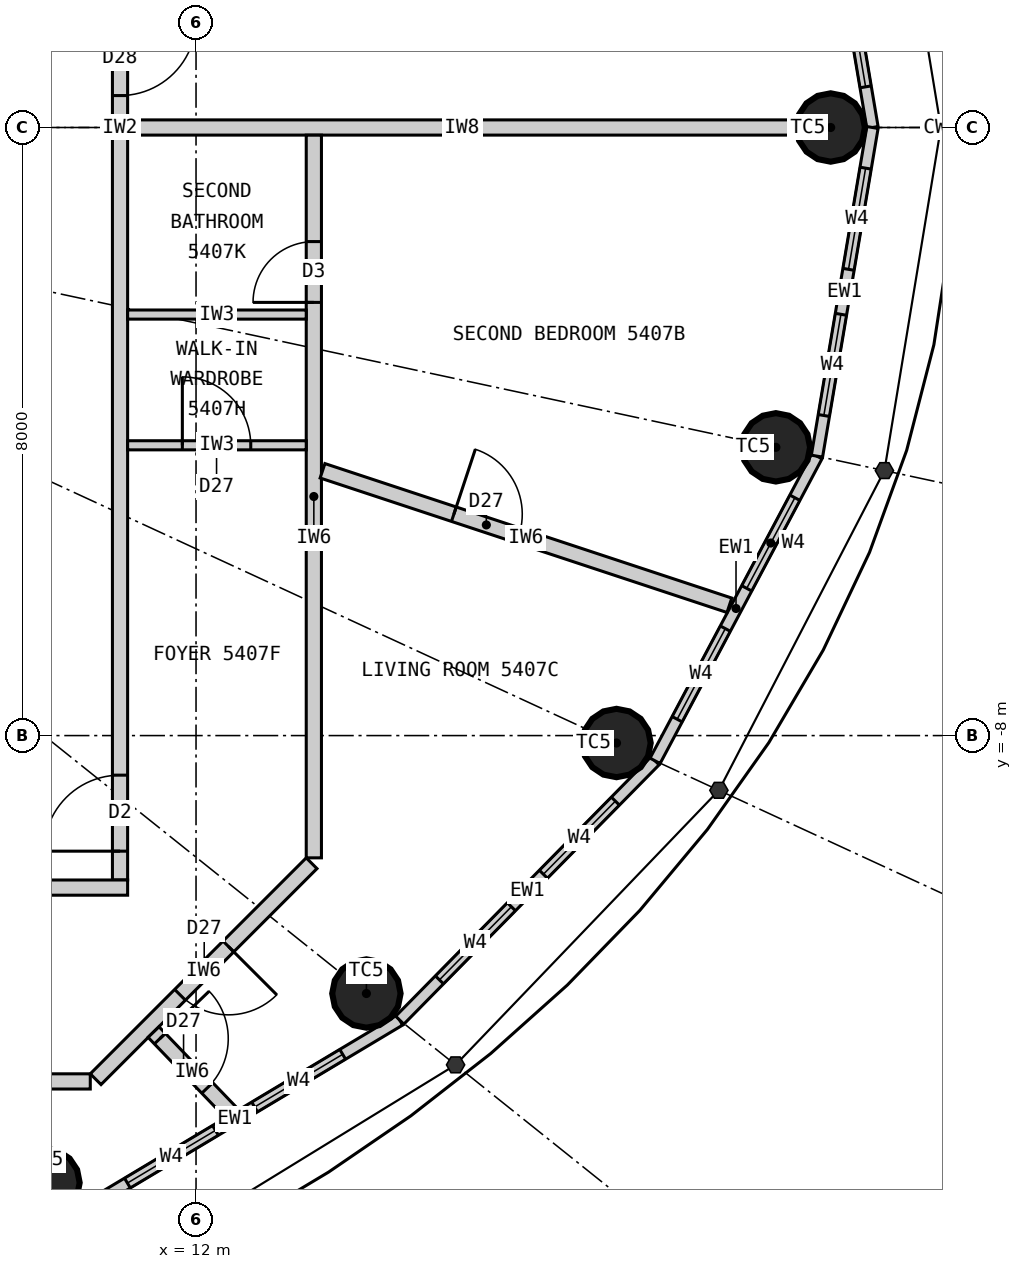
"""IFC4 building model, lengths in metres.
Left out: names, types, materials, properties, quantities, classifications, styles, units other than length and angle.
Written with IfcOpenShell. Run it as: python <this file> out.ifc"""

import sys

from ifc_helpers import new_model, si_unit, direction, frame, frame_2d, origin, origin_2d, place, context, subcontext, project, spatial, rectangle, circle, extrude, element, fill, save


model = new_model("IFC4")
c1 = context("Model", 3, precision=1e-05, world=origin(), true_north=direction((0.0, 1.0)))
c2 = subcontext(c1, "Body", "Model", "MODEL_VIEW")
j1 = project(units=[si_unit("LENGTHUNIT", "METRE"), si_unit("PLANEANGLEUNIT", "RADIAN")], contexts=[c1])
p1 = place(None, origin())
s1 = spatial("IfcSite", under=j1, at=p1, CompositionType="ELEMENT")
p2 = place(p1, origin())
s2 = spatial("IfcBuilding", under=s1, at=p2, CompositionType="ELEMENT")
p3 = place(p2, frame((0.0, 0.0, 202.8)))
s3 = spatial("IfcBuildingStorey", under=s2, at=p3, CompositionType="ELEMENT", Elevation=202.8)
for number, where, z_axis, x_axis in (
    (1, (20.35, 0.0, 0.0), (0.0, 0.0, 1.0), (1.0, 0.0, 0.0)),
    (2, (10.019, -13.883, 0.0), (0.0, 0.0, 1.0), (1.0, 0.0, 0.0)),
    (3, (14.241, -11.393, 0.0), (0.0, 0.0, 1.0), (1.0, 0.0, 0.0)),
    (4, (17.532, -8.098, 0.0), (0.0, 0.0, 1.0), (1.0, 0.0, 0.0)),
    (5, (19.629, -4.208, 0.0), (0.0, 0.0, 1.0), (1.0, 0.0, 0.0)),
):
    element("IfcColumn", number, at=place(p3, frame(where, z_axis=z_axis, x_axis=x_axis)), inside=s3, PredefinedType="COLUMN", context=c2, shape_type="SweptSolid", body=[
        extrude(circle(Radius=0.45, at=origin_2d()), origin(), (0.0, 0.0, 1.0), 3.3),
    ])
p4 = place(p3, frame((20.9, 0.0, 0.0), z_axis=(0.0, 0.0, 1.0), x_axis=(-0.166538513568, 0.986034950445, 0.0)))
e6 = element("IfcWall", 6, at=p4, inside=s3, PredefinedType="ELEMENTEDWALL", context=c2, shape_type="SweptSolid", body=[
    extrude(rectangle(XDim=4.385, YDim=0.15, at=frame_2d((2.192, 0.0))), origin(), (0.0, 0.0, 1.0), 3.12),
])
p5 = place(p4, frame((0.542, 0.0, 0.9)))
e7 = element("IfcOpeningElement", 7, at=p5, cuts=e6, PredefinedType="OPENING", context=c2, shape_type="SweptSolid", body=[
    extrude(rectangle(XDim=1.35, YDim=1.9, at=frame_2d((0.675, 0.95))), frame((0.0, 0.085, 0.0), z_axis=(0.0, -1.0, 0.0), x_axis=(1.0, 0.0, 0.0)), (0.0, 0.0, 1.0), 0.17),
])
p6 = place(p4, frame((2.492, 0.0, 0.9)))
e8 = element("IfcOpeningElement", 8, at=p6, cuts=e6, PredefinedType="OPENING", context=c2, shape_type="SweptSolid", body=[
    extrude(rectangle(XDim=1.35, YDim=1.9, at=frame_2d((0.675, 0.95))), frame((0.0, 0.085, 0.0), z_axis=(0.0, -1.0, 0.0), x_axis=(1.0, 0.0, 0.0)), (0.0, 0.0, 1.0), 0.17),
])
p7 = place(p3, frame((10.346, -14.336, 0.0), z_axis=(0.0, 0.0, 1.0), x_axis=(0.85822150553, 0.513279502265, 0.0)))
e9 = element("IfcWall", 9, at=p7, inside=s3, PredefinedType="ELEMENTEDWALL", context=c2, shape_type="SweptSolid", body=[
    extrude(rectangle(XDim=5.05, YDim=0.15, at=frame_2d((2.525, 0.0))), origin(), (0.0, 0.0, 1.0), 3.12),
])
p8 = place(p7, frame((0.875, 0.0, 0.9)))
e10 = element("IfcOpeningElement", 10, at=p8, cuts=e9, PredefinedType="OPENING", context=c2, shape_type="SweptSolid", body=[
    extrude(rectangle(XDim=1.35, YDim=1.9, at=frame_2d((0.675, 0.95))), frame((0.0, 0.085, 0.0), z_axis=(0.0, -1.0, 0.0), x_axis=(1.0, 0.0, 0.0)), (0.0, 0.0, 1.0), 0.17),
])
p9 = place(p7, frame((2.825, 0.0, 0.9)))
e11 = element("IfcOpeningElement", 11, at=p9, cuts=e9, PredefinedType="OPENING", context=c2, shape_type="SweptSolid", body=[
    extrude(rectangle(XDim=1.35, YDim=1.9, at=frame_2d((0.675, 0.95))), frame((0.0, 0.085, 0.0), z_axis=(0.0, -1.0, 0.0), x_axis=(1.0, 0.0, 0.0)), (0.0, 0.0, 1.0), 0.17),
])
p10 = place(p3, frame((14.68, -11.744, 0.0), z_axis=(0.0, 0.0, 1.0), x_axis=(0.701527379618, 0.712642501993, 0.0)))
e12 = element("IfcWall", 12, at=p10, inside=s3, PredefinedType="ELEMENTEDWALL", context=c2, shape_type="SweptSolid", body=[
    extrude(rectangle(XDim=4.788, YDim=0.15, at=frame_2d((2.394, 0.0))), origin(), (0.0, 0.0, 1.0), 3.12),
])
p11 = place(p10, frame((0.744, 0.0, 0.9)))
e13 = element("IfcOpeningElement", 13, at=p11, cuts=e12, PredefinedType="OPENING", context=c2, shape_type="SweptSolid", body=[
    extrude(rectangle(XDim=1.35, YDim=1.9, at=frame_2d((0.675, 0.95))), frame((0.0, 0.085, 0.0), z_axis=(0.0, -1.0, 0.0), x_axis=(1.0, 0.0, 0.0)), (0.0, 0.0, 1.0), 0.17),
])
p12 = place(p10, frame((2.694, 0.0, 0.9)))
e14 = element("IfcOpeningElement", 14, at=p12, cuts=e12, PredefinedType="OPENING", context=c2, shape_type="SweptSolid", body=[
    extrude(rectangle(XDim=1.35, YDim=1.9, at=frame_2d((0.675, 0.95))), frame((0.0, 0.085, 0.0), z_axis=(0.0, -1.0, 0.0), x_axis=(1.0, 0.0, 0.0)), (0.0, 0.0, 1.0), 0.17),
])
p13 = place(p3, frame((18.04, -8.332, 0.0), z_axis=(0.0, 0.0, 1.0), x_axis=(0.469256152955, 0.883062094597, 0.0)))
e15 = element("IfcWall", 15, at=p13, inside=s3, PredefinedType="ELEMENTEDWALL", context=c2, shape_type="SweptSolid", body=[
    extrude(rectangle(XDim=4.539, YDim=0.15, at=frame_2d((2.27, 0.0))), origin(), (0.0, 0.0, 1.0), 3.12),
])
p14 = place(p13, frame((0.62, 0.0, 0.9)))
e16 = element("IfcOpeningElement", 16, at=p14, cuts=e15, PredefinedType="OPENING", context=c2, shape_type="SweptSolid", body=[
    extrude(rectangle(XDim=1.35, YDim=1.9, at=frame_2d((0.675, 0.95))), frame((0.0, 0.085, 0.0), z_axis=(0.0, -1.0, 0.0), x_axis=(1.0, 0.0, 0.0)), (0.0, 0.0, 1.0), 0.17),
])
p15 = place(p13, frame((2.57, 0.0, 0.9)))
e17 = element("IfcOpeningElement", 17, at=p15, cuts=e15, PredefinedType="OPENING", context=c2, shape_type="SweptSolid", body=[
    extrude(rectangle(XDim=1.35, YDim=1.9, at=frame_2d((0.675, 0.95))), frame((0.0, 0.085, 0.0), z_axis=(0.0, -1.0, 0.0), x_axis=(1.0, 0.0, 0.0)), (0.0, 0.0, 1.0), 0.17),
])
p16 = place(p3, frame((20.17, -4.323, 0.0), z_axis=(0.0, 0.0, 1.0), x_axis=(0.166538513568, 0.986034950445, 0.0)))
e18 = element("IfcWall", 18, at=p16, inside=s3, PredefinedType="ELEMENTEDWALL", context=c2, shape_type="SweptSolid", body=[
    extrude(rectangle(XDim=4.385, YDim=0.15, at=frame_2d((2.192, 0.0))), origin(), (0.0, 0.0, 1.0), 3.12),
])
p17 = place(p16, frame((0.542, 0.0, 0.9)))
e19 = element("IfcOpeningElement", 19, at=p17, cuts=e18, PredefinedType="OPENING", context=c2, shape_type="SweptSolid", body=[
    extrude(rectangle(XDim=1.35, YDim=1.9, at=frame_2d((0.675, 0.95))), frame((0.0, 0.085, 0.0), z_axis=(0.0, -1.0, 0.0), x_axis=(1.0, 0.0, 0.0)), (0.0, 0.0, 1.0), 0.17),
])
p18 = place(p16, frame((2.492, 0.0, 0.9)))
e20 = element("IfcOpeningElement", 20, at=p18, cuts=e18, PredefinedType="OPENING", context=c2, shape_type="SweptSolid", body=[
    extrude(rectangle(XDim=1.35, YDim=1.9, at=frame_2d((0.675, 0.95))), frame((0.0, 0.085, 0.0), z_axis=(0.0, -1.0, 0.0), x_axis=(1.0, 0.0, 0.0)), (0.0, 0.0, 1.0), 0.17),
])
p19 = place(p3, frame((11.0, -9.9, 0.0), z_axis=(0.0, 0.0, 1.0), x_axis=(0.0, 1.0, 0.0)))
e21 = element("IfcWall", 21, at=p19, inside=s3, PredefinedType="PARTITIONING", context=c2, shape_type="SweptSolid", body=[
    extrude(rectangle(XDim=19.8, YDim=0.2, at=frame_2d((9.9, 0.0))), origin(), (0.0, 0.0, 1.0), 3.12),
])
p20 = place(p19, frame((10.32, 0.0, 0.0)))
e22 = element("IfcOpeningElement", 22, at=p20, cuts=e21, PredefinedType="OPENING", context=c2, shape_type="SweptSolid", body=[
    extrude(rectangle(XDim=1.0, YDim=2.2, at=frame_2d((0.5, 1.1))), frame((0.0, 0.11, 0.0), z_axis=(0.0, -1.0, 0.0), x_axis=(1.0, 0.0, 0.0)), (0.0, 0.0, 1.0), 0.22),
])
p21 = place(p19, frame((18.653, 0.0, 0.0)))
e23 = element("IfcOpeningElement", 23, at=p21, cuts=e21, PredefinedType="OPENING", context=c2, shape_type="SweptSolid", body=[
    extrude(rectangle(XDim=1.0, YDim=2.2, at=frame_2d((0.5, 1.1))), frame((0.0, 0.11, 0.0), z_axis=(0.0, -1.0, 0.0), x_axis=(1.0, 0.0, 0.0)), (0.0, 0.0, 1.0), 0.22),
])
p22 = place(p19, frame((0.379, 0.0, 0.0)))
e24 = element("IfcOpeningElement", 24, at=p22, cuts=e21, PredefinedType="OPENING", context=c2, shape_type="SweptSolid", body=[
    extrude(rectangle(XDim=1.0, YDim=2.2, at=frame_2d((0.5, 1.1))), frame((0.0, 0.11, 0.0), z_axis=(0.0, -1.0, 0.0), x_axis=(1.0, 0.0, 0.0)), (0.0, 0.0, 1.0), 0.22),
])
p23 = place(p3, frame((11.1, -10.0, 0.0), z_axis=(0.0, 0.0, 1.0), x_axis=(-1.0, 0.0, 0.0)))
e25 = element("IfcWall", 25, at=p23, inside=s3, PredefinedType="PARTITIONING", context=c2, shape_type="SweptSolid", body=[
    extrude(rectangle(XDim=12.559, YDim=0.2, at=frame_2d((6.28, 0.0))), origin(), (0.0, 0.0, 1.0), 3.12),
])
p24 = place(p3, frame((11.1, 0.0, 0.0), z_axis=(0.0, 0.0, 1.0), x_axis=(1.0, 0.0, 0.0)))
e26 = element("IfcWall", 26, at=p24, inside=s3, PredefinedType="PARTITIONING", context=c2, shape_type="SweptSolid", body=[
    extrude(rectangle(XDim=8.8, YDim=0.2, at=frame_2d((4.4, 0.0))), origin(), (0.0, 0.0, 1.0), 2.37),
])
p25 = place(p3, frame((4.325, -12.55, 0.0), z_axis=(0.0, 0.0, 1.0), x_axis=(1.0, 0.0, 0.0)))
e27 = element("IfcWall", 27, at=p25, inside=s3, PredefinedType="PARTITIONING", context=c2, shape_type="SweptSolid", body=[
    extrude(rectangle(XDim=6.284, YDim=0.2, at=frame_2d((3.142, 0.0))), origin(), (0.0, 0.0, 1.0), 3.12),
])
p26 = place(p25, frame((0.564, 0.0, 0.0)))
e28 = element("IfcOpeningElement", 28, at=p26, cuts=e27, PredefinedType="OPENING", context=c2, shape_type="SweptSolid", body=[
    extrude(rectangle(XDim=0.8, YDim=2.1, at=frame_2d((0.4, 1.05))), frame((0.0, 0.11, 0.0), z_axis=(0.0, -1.0, 0.0), x_axis=(1.0, 0.0, 0.0)), (0.0, 0.0, 1.0), 0.22),
])
p27 = place(p3, frame((10.679, -12.521, 0.0), z_axis=(0.0, 0.0, 1.0), x_axis=(0.707106781187, 0.707106781187, 0.0)))
e29 = element("IfcWall", 29, at=p27, inside=s3, PredefinedType="PARTITIONING", context=c2, shape_type="SweptSolid", body=[
    extrude(rectangle(XDim=4.019, YDim=0.2, at=frame_2d((2.009, 0.0))), origin(), (0.0, 0.0, 1.0), 3.12),
])
p28 = place(p27, frame((1.57, 0.0, 0.0)))
e30 = element("IfcOpeningElement", 30, at=p28, cuts=e29, PredefinedType="OPENING", context=c2, shape_type="SweptSolid", body=[
    extrude(rectangle(XDim=0.9, YDim=2.1, at=frame_2d((0.45, 1.05))), frame((0.0, 0.11, 0.0), z_axis=(0.0, -1.0, 0.0), x_axis=(1.0, 0.0, 0.0)), (0.0, 0.0, 1.0), 0.22),
])
p29 = place(p3, frame((13.55, -9.609, 0.0), z_axis=(0.0, 0.0, 1.0), x_axis=(0.0, 1.0, 0.0)))
e31 = element("IfcWall", 31, at=p29, inside=s3, PredefinedType="PARTITIONING", context=c2, shape_type="SweptSolid", body=[
    extrude(rectangle(XDim=9.508, YDim=0.2, at=frame_2d((4.754, 0.0))), origin(), (0.0, 0.0, 1.0), 3.12),
])
p30 = place(p29, frame((7.308, 0.0, 0.0)))
e32 = element("IfcOpeningElement", 32, at=p30, cuts=e31, PredefinedType="OPENING", context=c2, shape_type="SweptSolid", body=[
    extrude(rectangle(XDim=0.8, YDim=2.1, at=frame_2d((0.4, 1.05))), frame((0.0, 0.11, 0.0), z_axis=(0.0, -1.0, 0.0), x_axis=(1.0, 0.0, 0.0)), (0.0, 0.0, 1.0), 0.22),
])
p31 = place(p3, frame((11.441, -11.9, 0.0), z_axis=(0.0, 0.0, 1.0), x_axis=(0.692958717259, -0.720977264672, 0.0)))
e33 = element("IfcWall", 33, at=p31, inside=s3, PredefinedType="PARTITIONING", context=c2, shape_type="SweptSolid", body=[
    extrude(rectangle(XDim=1.464, YDim=0.2, at=frame_2d((0.732, 0.0))), origin(), (0.0, 0.0, 1.0), 3.12),
])
p32 = place(p31, frame((0.12, 0.0, 0.0)))
e34 = element("IfcOpeningElement", 34, at=p32, cuts=e33, PredefinedType="OPENING", context=c2, shape_type="SweptSolid", body=[
    extrude(rectangle(XDim=0.9, YDim=2.1, at=frame_2d((0.45, 1.05))), frame((0.0, 0.11, 0.0), z_axis=(0.0, -1.0, 0.0), x_axis=(1.0, 0.0, 0.0)), (0.0, 0.0, 1.0), 0.22),
])
p33 = place(p3, frame((13.664, -4.516, 0.0), z_axis=(0.0, 0.0, 1.0), x_axis=(0.949481375941, -0.313823384632, 0.0)))
e35 = element("IfcWall", 35, at=p33, inside=s3, PredefinedType="PARTITIONING", context=c2, shape_type="SweptSolid", body=[
    extrude(rectangle(XDim=5.638, YDim=0.2, at=frame_2d((2.819, 0.0))), origin(), (0.0, 0.0, 1.0), 3.12),
])
p34 = place(p33, frame((1.82, 0.0, 0.0)))
e36 = element("IfcOpeningElement", 36, at=p34, cuts=e35, PredefinedType="OPENING", context=c2, shape_type="SweptSolid", body=[
    extrude(rectangle(XDim=0.9, YDim=2.1, at=frame_2d((0.45, 1.05))), frame((0.0, 0.11, 0.0), z_axis=(0.0, -1.0, 0.0), x_axis=(1.0, 0.0, 0.0)), (0.0, 0.0, 1.0), 0.22),
])
p35 = place(p3, frame((11.1, -4.181, 0.0), z_axis=(0.0, 0.0, 1.0), x_axis=(1.0, 0.0, 0.0)))
e37 = element("IfcWall", 37, at=p35, inside=s3, PredefinedType="PARTITIONING", context=c2, shape_type="SweptSolid", body=[
    extrude(rectangle(XDim=2.35, YDim=0.12, at=frame_2d((1.175, 0.0))), origin(), (0.0, 0.0, 1.0), 3.12),
])
p36 = place(p35, frame((0.72, 0.0, 0.0)))
e38 = element("IfcOpeningElement", 38, at=p36, cuts=e37, PredefinedType="OPENING", context=c2, shape_type="SweptSolid", body=[
    extrude(rectangle(XDim=0.9, YDim=2.1, at=frame_2d((0.45, 1.05))), frame((0.0, 0.07, 0.0), z_axis=(0.0, -1.0, 0.0), x_axis=(1.0, 0.0, 0.0)), (0.0, 0.0, 1.0), 0.14),
])
p37 = place(p3, frame((11.1, -2.461, 0.0), z_axis=(0.0, 0.0, 1.0), x_axis=(1.0, 0.0, 0.0)))
e39 = element("IfcWall", 39, at=p37, inside=s3, PredefinedType="PARTITIONING", context=c2, shape_type="SweptSolid", body=[
    extrude(rectangle(XDim=2.35, YDim=0.12, at=frame_2d((1.175, 0.0))), origin(), (0.0, 0.0, 1.0), 3.12),
])
p38 = place(p5, origin())
e40 = element("IfcWindow", 40, at=p38, inside=s3, PartitioningType="SINGLE_PANEL", PredefinedType="WINDOW", context=c2, shape_type="SweptSolid", body=[
    extrude(rectangle(XDim=1.35, YDim=1.9, at=frame_2d((0.675, 0.95))), frame((0.0, 0.03, 0.0), z_axis=(0.0, -1.0, 0.0), x_axis=(1.0, 0.0, 0.0)), (0.0, 0.0, 1.0), 0.06),
])
fill(e7, e40)
p39 = place(p8, origin())
e41 = element("IfcWindow", 41, at=p39, inside=s3, PartitioningType="SINGLE_PANEL", PredefinedType="WINDOW", context=c2, shape_type="SweptSolid", body=[
    extrude(rectangle(XDim=1.35, YDim=1.9, at=frame_2d((0.675, 0.95))), frame((0.0, 0.03, 0.0), z_axis=(0.0, -1.0, 0.0), x_axis=(1.0, 0.0, 0.0)), (0.0, 0.0, 1.0), 0.06),
])
fill(e10, e41)
p40 = place(p9, origin())
e42 = element("IfcWindow", 42, at=p40, inside=s3, PartitioningType="SINGLE_PANEL", PredefinedType="WINDOW", context=c2, shape_type="SweptSolid", body=[
    extrude(rectangle(XDim=1.35, YDim=1.9, at=frame_2d((0.675, 0.95))), frame((0.0, 0.03, 0.0), z_axis=(0.0, -1.0, 0.0), x_axis=(1.0, 0.0, 0.0)), (0.0, 0.0, 1.0), 0.06),
])
fill(e11, e42)
p41 = place(p11, origin())
e43 = element("IfcWindow", 43, at=p41, inside=s3, PartitioningType="SINGLE_PANEL", PredefinedType="WINDOW", context=c2, shape_type="SweptSolid", body=[
    extrude(rectangle(XDim=1.35, YDim=1.9, at=frame_2d((0.675, 0.95))), frame((0.0, 0.03, 0.0), z_axis=(0.0, -1.0, 0.0), x_axis=(1.0, 0.0, 0.0)), (0.0, 0.0, 1.0), 0.06),
])
fill(e13, e43)
p42 = place(p12, origin())
e44 = element("IfcWindow", 44, at=p42, inside=s3, PartitioningType="SINGLE_PANEL", PredefinedType="WINDOW", context=c2, shape_type="SweptSolid", body=[
    extrude(rectangle(XDim=1.35, YDim=1.9, at=frame_2d((0.675, 0.95))), frame((0.0, 0.03, 0.0), z_axis=(0.0, -1.0, 0.0), x_axis=(1.0, 0.0, 0.0)), (0.0, 0.0, 1.0), 0.06),
])
fill(e14, e44)
p43 = place(p14, origin())
e45 = element("IfcWindow", 45, at=p43, inside=s3, PartitioningType="SINGLE_PANEL", PredefinedType="WINDOW", context=c2, shape_type="SweptSolid", body=[
    extrude(rectangle(XDim=1.35, YDim=1.9, at=frame_2d((0.675, 0.95))), frame((0.0, 0.03, 0.0), z_axis=(0.0, -1.0, 0.0), x_axis=(1.0, 0.0, 0.0)), (0.0, 0.0, 1.0), 0.06),
])
fill(e16, e45)
p44 = place(p15, origin())
e46 = element("IfcWindow", 46, at=p44, inside=s3, PartitioningType="SINGLE_PANEL", PredefinedType="WINDOW", context=c2, shape_type="SweptSolid", body=[
    extrude(rectangle(XDim=1.35, YDim=1.9, at=frame_2d((0.675, 0.95))), frame((0.0, 0.03, 0.0), z_axis=(0.0, -1.0, 0.0), x_axis=(1.0, 0.0, 0.0)), (0.0, 0.0, 1.0), 0.06),
])
fill(e17, e46)
p45 = place(p17, origin())
e47 = element("IfcWindow", 47, at=p45, inside=s3, PartitioningType="SINGLE_PANEL", PredefinedType="WINDOW", context=c2, shape_type="SweptSolid", body=[
    extrude(rectangle(XDim=1.35, YDim=1.9, at=frame_2d((0.675, 0.95))), frame((0.0, 0.03, 0.0), z_axis=(0.0, -1.0, 0.0), x_axis=(1.0, 0.0, 0.0)), (0.0, 0.0, 1.0), 0.06),
])
fill(e19, e47)
p46 = place(p18, origin())
e48 = element("IfcWindow", 48, at=p46, inside=s3, PartitioningType="SINGLE_PANEL", PredefinedType="WINDOW", context=c2, shape_type="SweptSolid", body=[
    extrude(rectangle(XDim=1.35, YDim=1.9, at=frame_2d((0.675, 0.95))), frame((0.0, 0.03, 0.0), z_axis=(0.0, -1.0, 0.0), x_axis=(1.0, 0.0, 0.0)), (0.0, 0.0, 1.0), 0.06),
])
fill(e20, e48)
p47 = place(p20, origin())
e49 = element("IfcDoor", 49, at=p47, inside=s3, OperationType="SINGLE_SWING_RIGHT", PredefinedType="DOOR", context=c2, shape_type="SweptSolid", body=[
    extrude(rectangle(XDim=1.0, YDim=2.2, at=frame_2d((0.5, 1.1))), frame((0.0, 0.025, 0.0), z_axis=(0.0, -1.0, 0.0), x_axis=(1.0, 0.0, 0.0)), (0.0, 0.0, 1.0), 0.05),
])
fill(e22, e49)
p48 = place(p22, origin())
e50 = element("IfcDoor", 50, at=p48, inside=s3, OperationType="SINGLE_SWING_LEFT", PredefinedType="DOOR", context=c2, shape_type="SweptSolid", body=[
    extrude(rectangle(XDim=1.0, YDim=2.2, at=frame_2d((0.5, 1.1))), frame((0.0, 0.025, 0.0), z_axis=(0.0, -1.0, 0.0), x_axis=(1.0, 0.0, 0.0)), (0.0, 0.0, 1.0), 0.05),
])
fill(e24, e50)
p49 = place(p36, origin())
e51 = element("IfcDoor", 51, at=p49, inside=s3, OperationType="SINGLE_SWING_LEFT", PredefinedType="DOOR", context=c2, shape_type="SweptSolid", body=[
    extrude(rectangle(XDim=0.9, YDim=2.1, at=frame_2d((0.45, 1.05))), frame((0.0, 0.025, 0.0), z_axis=(0.0, -1.0, 0.0), x_axis=(1.0, 0.0, 0.0)), (0.0, 0.0, 1.0), 0.05),
])
fill(e38, e51)
p50 = place(p30, origin())
e52 = element("IfcDoor", 52, at=p50, inside=s3, OperationType="SINGLE_SWING_LEFT", PredefinedType="DOOR", context=c2, shape_type="SweptSolid", body=[
    extrude(rectangle(XDim=0.8, YDim=2.1, at=frame_2d((0.4, 1.05))), frame((0.0, 0.025, 0.0), z_axis=(0.0, -1.0, 0.0), x_axis=(1.0, 0.0, 0.0)), (0.0, 0.0, 1.0), 0.05),
])
fill(e32, e52)
p51 = place(p28, origin())
e53 = element("IfcDoor", 53, at=p51, inside=s3, OperationType="SINGLE_SWING_RIGHT", PredefinedType="DOOR", context=c2, shape_type="SweptSolid", body=[
    extrude(rectangle(XDim=0.9, YDim=2.1, at=frame_2d((0.45, 1.05))), frame((0.0, 0.025, 0.0), z_axis=(0.0, -1.0, 0.0), x_axis=(1.0, 0.0, 0.0)), (0.0, 0.0, 1.0), 0.05),
])
fill(e30, e53)
p52 = place(p32, origin())
e54 = element("IfcDoor", 54, at=p52, inside=s3, OperationType="SINGLE_SWING_LEFT", PredefinedType="DOOR", context=c2, shape_type="SweptSolid", body=[
    extrude(rectangle(XDim=0.9, YDim=2.1, at=frame_2d((0.45, 1.05))), frame((0.0, 0.025, 0.0), z_axis=(0.0, -1.0, 0.0), x_axis=(1.0, 0.0, 0.0)), (0.0, 0.0, 1.0), 0.05),
])
fill(e34, e54)
p53 = place(p34, origin())
e55 = element("IfcDoor", 55, at=p53, inside=s3, OperationType="SINGLE_SWING_LEFT", PredefinedType="DOOR", context=c2, shape_type="SweptSolid", body=[
    extrude(rectangle(XDim=0.9, YDim=2.1, at=frame_2d((0.45, 1.05))), frame((0.0, 0.025, 0.0), z_axis=(0.0, -1.0, 0.0), x_axis=(1.0, 0.0, 0.0)), (0.0, 0.0, 1.0), 0.05),
])
fill(e36, e55)
save(model, sys.argv[1])
